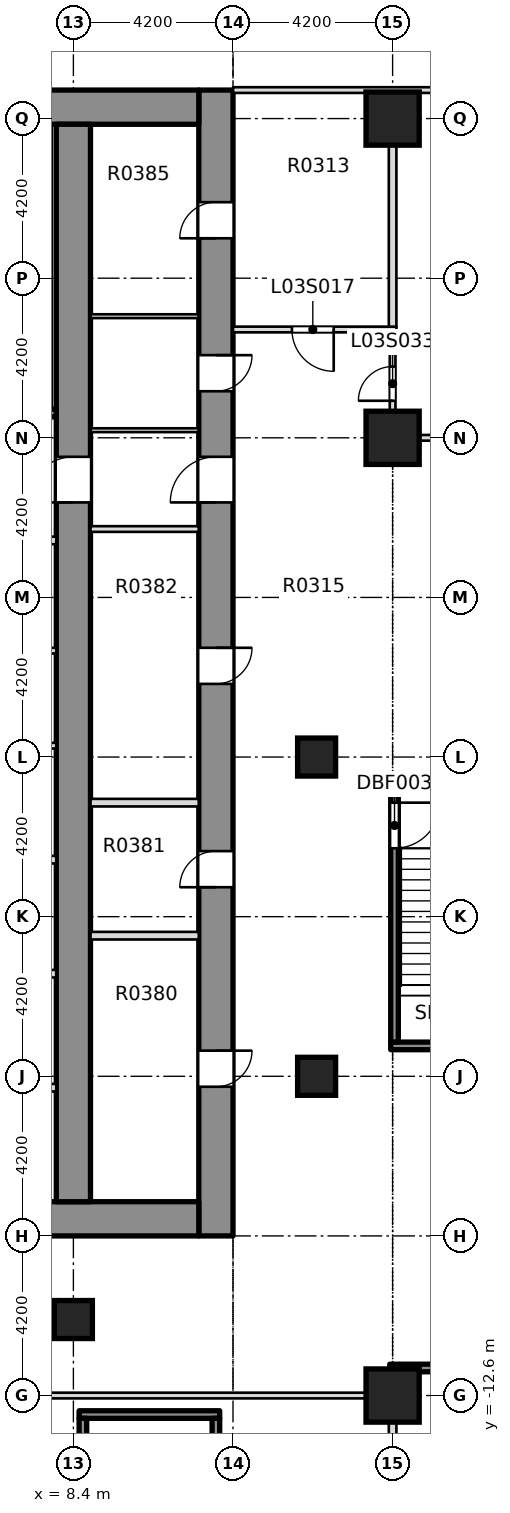
"""IFC4 building model, lengths in metres.
Left out: names, types, materials, properties, quantities, classifications, styles, units other than length and angle.
Written with IfcOpenShell. Run it as: python <this file> out.ifc"""

import sys

from ifc_helpers import new_model, si_unit, direction, frame, frame_2d, origin, origin_2d, place, context, subcontext, project, spatial, rectangle, extrude, element, fill, save


model = new_model("IFC4")
c1 = context("Model", 3, precision=1e-05, world=origin(), true_north=direction((0.0, 1.0)))
c2 = subcontext(c1, "Body", "Model", "MODEL_VIEW")
j1 = project(units=[si_unit("LENGTHUNIT", "METRE"), si_unit("PLANEANGLEUNIT", "RADIAN")], contexts=[c1])
p1 = place(None, origin())
s1 = spatial("IfcSite", under=j1, at=p1, CompositionType="ELEMENT")
p2 = place(p1, origin())
s2 = spatial("IfcBuilding", under=s1, at=p2, CompositionType="ELEMENT")
p3 = place(p2, frame((0.0, 0.0, 20.0)))
s3 = spatial("IfcBuildingStorey", under=s2, at=p3, CompositionType="ELEMENT", Elevation=20.0)
p4 = place(p3, frame((12.15, -8.4, -0.4), z_axis=(0.0, 0.0, 1.0), x_axis=(0.0, 1.0, 0.0)))
e1 = element("IfcWall", 1, at=p4, inside=s3, PredefinedType="SHEAR", context=c2, shape_type="SweptSolid", body=[
    extrude(rectangle(XDim=30.15, YDim=0.9, at=frame_2d((15.075, 0.0))), origin(), (0.0, 0.0, 1.0), 5.0),
])
p5 = place(p4, frame((3.925, 0.0, 0.4)))
e2 = element("IfcOpeningElement", 2, at=p5, cuts=e1, PredefinedType="OPENING", context=c2, shape_type="SweptSolid", body=[
    extrude(rectangle(XDim=0.95, YDim=2.1, at=frame_2d((0.475, 1.05))), frame((0.0, 0.46, 0.0), z_axis=(0.0, -1.0, 0.0), x_axis=(1.0, 0.0, 0.0)), (0.0, 0.0, 1.0), 0.92),
])
p6 = place(p4, frame((9.175, 0.0, 0.4)))
e3 = element("IfcOpeningElement", 3, at=p6, cuts=e1, PredefinedType="OPENING", context=c2, shape_type="SweptSolid", body=[
    extrude(rectangle(XDim=0.95, YDim=2.1, at=frame_2d((0.475, 1.05))), frame((0.0, 0.46, 0.0), z_axis=(0.0, -1.0, 0.0), x_axis=(1.0, 0.0, 0.0)), (0.0, 0.0, 1.0), 0.92),
])
p7 = place(p4, frame((14.525, 0.0, 0.4)))
e4 = element("IfcOpeningElement", 4, at=p7, cuts=e1, PredefinedType="OPENING", context=c2, shape_type="SweptSolid", body=[
    extrude(rectangle(XDim=0.95, YDim=2.1, at=frame_2d((0.475, 1.05))), frame((0.0, 0.46, 0.0), z_axis=(0.0, -1.0, 0.0), x_axis=(1.0, 0.0, 0.0)), (0.0, 0.0, 1.0), 0.92),
])
p8 = place(p4, frame((22.225, 0.0, 0.4)))
e5 = element("IfcOpeningElement", 5, at=p8, cuts=e1, PredefinedType="OPENING", context=c2, shape_type="SweptSolid", body=[
    extrude(rectangle(XDim=0.95, YDim=2.1, at=frame_2d((0.475, 1.05))), frame((0.0, 0.46, 0.0), z_axis=(0.0, -1.0, 0.0), x_axis=(1.0, 0.0, 0.0)), (0.0, 0.0, 1.0), 0.92),
])
p9 = place(p4, frame((26.25, 0.0, 0.4)))
e6 = element("IfcOpeningElement", 6, at=p9, cuts=e1, PredefinedType="OPENING", context=c2, shape_type="SweptSolid", body=[
    extrude(rectangle(XDim=0.95, YDim=2.1, at=frame_2d((0.475, 1.05))), frame((0.0, 0.46, 0.0), z_axis=(0.0, -1.0, 0.0), x_axis=(1.0, 0.0, 0.0)), (0.0, 0.0, 1.0), 0.92),
])
p10 = place(p4, frame((19.3, 0.0, 0.4)))
e7 = element("IfcOpeningElement", 7, at=p10, cuts=e1, PredefinedType="OPENING", context=c2, shape_type="SweptSolid", body=[
    extrude(rectangle(XDim=1.2, YDim=2.1, at=frame_2d((0.6, 1.05))), frame((0.0, 0.46, 0.0), z_axis=(0.0, -1.0, 0.0), x_axis=(1.0, 0.0, 0.0)), (0.0, 0.0, 1.0), 0.92),
])
p11 = place(p3, frame((-11.7, -7.95, -0.4), z_axis=(0.0, 0.0, 1.0), x_axis=(1.0, 0.0, 0.0)))
e8 = element("IfcWall", 8, at=p11, inside=s3, PredefinedType="SHEAR", context=c2, shape_type="SweptSolid", body=[
    extrude(rectangle(XDim=23.4, YDim=0.9, at=frame_2d((11.7, 0.0))), origin(), (0.0, 0.0, 1.0), 5.0),
])
p12 = place(p11, frame((6.95, 0.0, 0.4)))
e9 = element("IfcOpeningElement", 9, at=p12, cuts=e8, PredefinedType="OPENING", context=c2, shape_type="SweptSolid", body=[
    extrude(rectangle(XDim=1.8, YDim=2.1, at=frame_2d((0.9, 1.05))), frame((0.0, 0.46, 0.0), z_axis=(0.0, -1.0, 0.0), x_axis=(1.0, 0.0, 0.0)), (0.0, 0.0, 1.0), 0.92),
])
p13 = place(p11, frame((14.65, 0.0, 0.4)))
e10 = element("IfcOpeningElement", 10, at=p13, cuts=e8, PredefinedType="OPENING", context=c2, shape_type="SweptSolid", body=[
    extrude(rectangle(XDim=1.8, YDim=2.1, at=frame_2d((0.9, 1.05))), frame((0.0, 0.46, 0.0), z_axis=(0.0, -1.0, 0.0), x_axis=(1.0, 0.0, 0.0)), (0.0, 0.0, 1.0), 0.92),
])
p14 = place(p3, frame((-11.7, 21.3, -0.4), z_axis=(0.0, 0.0, 1.0), x_axis=(1.0, 0.0, 0.0)))
e11 = element("IfcWall", 11, at=p14, inside=s3, PredefinedType="SOLIDWALL", context=c2, shape_type="SweptSolid", body=[
    extrude(rectangle(XDim=23.4, YDim=0.9, at=frame_2d((11.7, 0.0))), origin(), (0.0, 0.0, 1.0), 5.0),
])
p15 = place(p3, frame((8.4, -7.5, -0.4), z_axis=(0.0, 0.0, 1.0), x_axis=(0.0, 1.0, 0.0)))
e12 = element("IfcWall", 12, at=p15, inside=s3, PredefinedType="SHEAR", context=c2, shape_type="SweptSolid", body=[
    extrude(rectangle(XDim=28.35, YDim=0.9, at=frame_2d((14.175, 0.0))), origin(), (0.0, 0.0, 1.0), 5.0),
])
p16 = place(p15, frame((18.4, 0.0, 0.4)))
e13 = element("IfcOpeningElement", 13, at=p16, cuts=e12, PredefinedType="OPENING", context=c2, shape_type="SweptSolid", body=[
    extrude(rectangle(XDim=1.2, YDim=2.1, at=frame_2d((0.6, 1.05))), frame((0.0, 0.46, 0.0), z_axis=(0.0, -1.0, 0.0), x_axis=(1.0, 0.0, 0.0)), (0.0, 0.0, 1.0), 0.92),
])
for number, where, z_axis, x_axis in (
    (14, (16.8, -12.6, -0.4), (0.0, 0.0, 1.0), (1.0, 0.0, 0.0)),
    (15, (16.8, 12.6, -0.4), (0.0, 0.0, 1.0), (1.0, 0.0, 0.0)),
    (16, (16.8, 21.0, -0.4), (0.0, 0.0, 1.0), (1.0, 0.0, 0.0)),
):
    element("IfcColumn", number, at=place(p3, frame(where, z_axis=z_axis, x_axis=x_axis)), inside=s3, PredefinedType="COLUMN", context=c2, shape_type="SweptSolid", body=[
        extrude(rectangle(XDim=1.4, YDim=1.4, at=origin_2d()), origin(), (0.0, 0.0, 1.0), 5.0),
    ])
for number, where, z_axis, x_axis in (
    (17, (8.4, -10.6, -0.4), (0.0, 0.0, 1.0), (1.0, 0.0, 0.0)),
    (18, (14.8, -4.2, -0.4), (0.0, 0.0, 1.0), (1.0, 0.0, 0.0)),
    (19, (14.8, 4.2, -0.4), (0.0, 0.0, 1.0), (1.0, 0.0, 0.0)),
):
    element("IfcColumn", number, at=place(p3, frame(where, z_axis=z_axis, x_axis=x_axis)), inside=s3, PredefinedType="COLUMN", context=c2, shape_type="SweptSolid", body=[
        extrude(rectangle(XDim=1.0, YDim=1.0, at=origin_2d()), origin(), (0.0, 0.0, 1.0), 5.0),
    ])
p17 = place(p3, frame((7.275, -12.6, 0.0), z_axis=(0.0, 0.0, 1.0), x_axis=(1.0, 0.0, 0.0)))
e20 = element("IfcWall", 20, at=p17, inside=s3, PredefinedType="PARTITIONING", context=c2, shape_type="SweptSolid", body=[
    extrude(rectangle(XDim=9.625, YDim=0.15, at=frame_2d((4.812, 0.0))), origin(), (0.0, 0.0, 1.0), 4.6),
])
p18 = place(p3, frame((16.725, -11.875, 0.0), z_axis=(0.0, 0.0, 1.0), x_axis=(1.0, 0.0, 0.0)))
e21 = element("IfcWall", 21, at=p18, inside=s3, PredefinedType="SOLIDWALL", context=c2, shape_type="SweptSolid", body=[
    extrude(rectangle(XDim=8.575, YDim=0.2, at=frame_2d((4.288, 0.0))), origin(), (0.0, 0.0, 1.0), 4.6),
])
p19 = place(p3, frame((16.725, 12.6, 0.0), z_axis=(0.0, 0.0, 1.0), x_axis=(1.0, 0.0, 0.0)))
e22 = element("IfcWall", 22, at=p19, inside=s3, PredefinedType="PARTITIONING", context=c2, shape_type="SweptSolid", body=[
    extrude(rectangle(XDim=8.575, YDim=0.15, at=frame_2d((4.288, 0.0))), origin(), (0.0, 0.0, 1.0), 4.6),
])
p20 = place(p3, frame((12.601, 15.45, 0.0), z_axis=(0.0, 0.0, 1.0), x_axis=(1.0, 0.0, 0.0)))
e23 = element("IfcWall", 23, at=p20, inside=s3, PredefinedType="PARTITIONING", context=c2, shape_type="SweptSolid", body=[
    extrude(rectangle(XDim=4.299, YDim=0.15, at=frame_2d((2.149, 0.0))), origin(), (0.0, 0.0, 1.0), 4.6),
])
p21 = place(p20, frame((1.549, 0.0, 0.0)))
e24 = element("IfcOpeningElement", 24, at=p21, cuts=e23, PredefinedType="OPENING", context=c2, shape_type="SweptSolid", body=[
    extrude(rectangle(XDim=1.1, YDim=2.1, at=frame_2d((0.55, 1.05))), frame((0.0, 0.085, 0.0), z_axis=(0.0, -1.0, 0.0), x_axis=(1.0, 0.0, 0.0)), (0.0, 0.0, 1.0), 0.17),
])
p22 = place(p3, frame((12.601, 21.75, 0.0), z_axis=(0.0, 0.0, 1.0), x_axis=(1.0, 0.0, 0.0)))
e25 = element("IfcWall", 25, at=p22, inside=s3, PredefinedType="PARTITIONING", context=c2, shape_type="SweptSolid", body=[
    extrude(rectangle(XDim=21.074, YDim=0.15, at=frame_2d((10.537, 0.0))), origin(), (0.0, 0.0, 1.0), 4.6),
])
p23 = place(p3, frame((16.8, -18.125, 0.0), z_axis=(0.0, 0.0, 1.0), x_axis=(0.0, 1.0, 0.0)))
e26 = element("IfcWall", 26, at=p23, inside=s3, PredefinedType="PARTITIONING", context=c2, shape_type="SweptSolid", body=[
    extrude(rectangle(XDim=5.45, YDim=0.2, at=frame_2d((2.725, 0.0))), origin(), (0.0, 0.0, 1.0), 4.6),
])
p24 = place(p3, frame((16.8, -12.525, 0.0), z_axis=(0.0, 0.0, 1.0), x_axis=(0.0, 1.0, 0.0)))
e27 = element("IfcWall", 27, at=p24, inside=s3, PredefinedType="PARTITIONING", context=c2, shape_type="SweptSolid", body=[
    extrude(rectangle(XDim=0.55, YDim=0.15, at=frame_2d((0.275, 0.0))), origin(), (0.0, 0.0, 1.0), 4.6),
])
p25 = place(p3, frame((16.8, 12.675, 0.0), z_axis=(0.0, 0.0, 1.0), x_axis=(0.0, 1.0, 0.0)))
e28 = element("IfcWall", 28, at=p25, inside=s3, PredefinedType="PARTITIONING", context=c2, shape_type="SweptSolid", body=[
    extrude(rectangle(XDim=2.7, YDim=0.15, at=frame_2d((1.35, 0.0))), origin(), (0.0, 0.0, 1.0), 4.6),
])
p26 = place(p25, frame((0.9, 0.0, 0.0)))
e29 = element("IfcOpeningElement", 29, at=p26, cuts=e28, PredefinedType="OPENING", context=c2, shape_type="SweptSolid", body=[
    extrude(rectangle(XDim=0.9, YDim=2.1, at=frame_2d((0.45, 1.05))), frame((0.0, 0.085, 0.0), z_axis=(0.0, -1.0, 0.0), x_axis=(1.0, 0.0, 0.0)), (0.0, 0.0, 1.0), 0.17),
])
p27 = place(p3, frame((16.8, 15.525, 0.0), z_axis=(0.0, 0.0, 1.0), x_axis=(0.0, 1.0, 0.0)))
e30 = element("IfcWall", 30, at=p27, inside=s3, PredefinedType="PARTITIONING", context=c2, shape_type="SweptSolid", body=[
    extrude(rectangle(XDim=6.15, YDim=0.2, at=frame_2d((3.075, 0.0))), origin(), (0.0, 0.0, 1.0), 4.6),
])
for number, where, z_axis, x_axis in (
    (31, (5.575, -4.5, 0.0), (0.0, 0.0, 1.0), (1.0, 0.0, 0.0)),
    (32, (5.575, -1.5, 0.0), (0.0, 0.0, 1.0), (1.0, 0.0, 0.0)),
    (33, (5.575, 1.5, 0.0), (0.0, 0.0, 1.0), (1.0, 0.0, 0.0)),
):
    element("IfcWall", number, at=place(p3, frame(where, z_axis=z_axis, x_axis=x_axis)), inside=s3, PredefinedType="PARTITIONING", context=c2, shape_type="SweptSolid", body=[
        extrude(rectangle(XDim=2.374, YDim=0.2, at=frame_2d((1.187, 0.0))), origin(), (0.0, 0.0, 1.0), 4.6),
    ])
p28 = place(p3, frame((5.425, 4.5, 0.0), z_axis=(0.0, 0.0, 1.0), x_axis=(1.0, 0.0, 0.0)))
e34 = element("IfcWall", 34, at=p28, inside=s3, PredefinedType="PARTITIONING", context=c2, shape_type="SweptSolid", body=[
    extrude(rectangle(XDim=2.524, YDim=0.15, at=frame_2d((1.262, 0.0))), origin(), (0.0, 0.0, 1.0), 4.6),
])
p29 = place(p3, frame((-7.949, 7.0, 0.0), z_axis=(0.0, 0.0, 1.0), x_axis=(1.0, 0.0, 0.0)))
e35 = element("IfcWall", 35, at=p29, inside=s3, PredefinedType="PARTITIONING", context=c2, shape_type="SweptSolid", body=[
    extrude(rectangle(XDim=15.898, YDim=0.15, at=frame_2d((7.949, 0.0))), origin(), (0.0, 0.0, 1.0), 4.6),
])
p30 = place(p29, frame((7.249, 0.0, 0.0)))
e36 = element("IfcOpeningElement", 36, at=p30, cuts=e35, PredefinedType="OPENING", context=c2, shape_type="SweptSolid", body=[
    extrude(rectangle(XDim=1.4, YDim=2.1, at=frame_2d((0.7, 1.05))), frame((0.0, 0.085, 0.0), z_axis=(0.0, -1.0, 0.0), x_axis=(1.0, 0.0, 0.0)), (0.0, 0.0, 1.0), 0.17),
])
p31 = place(p3, frame((3.6, 9.9, 0.0), z_axis=(0.0, 0.0, 1.0), x_axis=(1.0, 0.0, 0.0)))
e37 = element("IfcWall", 37, at=p31, inside=s3, PredefinedType="PARTITIONING", context=c2, shape_type="SweptSolid", body=[
    extrude(rectangle(XDim=4.349, YDim=0.2, at=frame_2d((2.174, 0.0))), origin(), (0.0, 0.0, 1.0), 4.6),
])
p32 = place(p31, frame((2.25, 0.0, 0.0)))
e38 = element("IfcOpeningElement", 38, at=p32, cuts=e37, PredefinedType="OPENING", context=c2, shape_type="SweptSolid", body=[
    extrude(rectangle(XDim=1.1, YDim=2.1, at=frame_2d((0.55, 1.05))), frame((0.0, 0.11, 0.0), z_axis=(0.0, -1.0, 0.0), x_axis=(1.0, 0.0, 0.0)), (0.0, 0.0, 1.0), 0.22),
])
p33 = place(p3, frame((3.425, 13.25, 0.0), z_axis=(0.0, 0.0, 1.0), x_axis=(1.0, 0.0, 0.0)))
e39 = element("IfcWall", 39, at=p33, inside=s3, PredefinedType="SOLIDWALL", context=c2, shape_type="SweptSolid", body=[
    extrude(rectangle(XDim=4.524, YDim=0.2, at=frame_2d((2.262, 0.0))), origin(), (0.0, 0.0, 1.0), 4.6),
])
p34 = place(p33, frame((1.825, 0.0, 0.0)))
e40 = element("IfcOpeningElement", 40, at=p34, cuts=e39, PredefinedType="OPENING", context=c2, shape_type="SweptSolid", body=[
    extrude(rectangle(XDim=1.2, YDim=2.1, at=frame_2d((0.6, 1.05))), frame((0.0, 0.11, 0.0), z_axis=(0.0, -1.0, 0.0), x_axis=(1.0, 0.0, 0.0)), (0.0, 0.0, 1.0), 0.22),
])
for number, where, z_axis, x_axis in (
    (41, (8.851, -0.5, 0.0), (0.0, 0.0, 1.0), (1.0, 0.0, 0.0)),
    (42, (8.851, 3.0, 0.0), (0.0, 0.0, 1.0), (1.0, 0.0, 0.0)),
):
    element("IfcWall", number, at=place(p3, frame(where, z_axis=z_axis, x_axis=x_axis)), inside=s3, PredefinedType="PARTITIONING", context=c2, shape_type="SweptSolid", body=[
        extrude(rectangle(XDim=2.848, YDim=0.2, at=frame_2d((1.424, 0.0))), origin(), (0.0, 0.0, 1.0), 4.6),
    ])
p35 = place(p3, frame((8.851, 10.2, 0.0), z_axis=(0.0, 0.0, 1.0), x_axis=(1.0, 0.0, 0.0)))
e43 = element("IfcWall", 43, at=p35, inside=s3, PredefinedType="PARTITIONING", context=c2, shape_type="SweptSolid", body=[
    extrude(rectangle(XDim=2.848, YDim=0.15, at=frame_2d((1.424, 0.0))), origin(), (0.0, 0.0, 1.0), 4.6),
])
for number, where, z_axis, x_axis in (
    (44, (8.851, 12.8, 0.0), (0.0, 0.0, 1.0), (1.0, 0.0, 0.0)),
    (45, (8.851, 15.8, 0.0), (0.0, 0.0, 1.0), (1.0, 0.0, 0.0)),
):
    element("IfcWall", number, at=place(p3, frame(where, z_axis=z_axis, x_axis=x_axis)), inside=s3, PredefinedType="PARTITIONING", context=c2, shape_type="SweptSolid", body=[
        extrude(rectangle(XDim=2.848, YDim=0.1, at=frame_2d((1.424, 0.0))), origin(), (0.0, 0.0, 1.0), 4.6),
    ])
p36 = place(p3, frame((8.55, -13.1, 0.0), z_axis=(0.0, 0.0, 1.0), x_axis=(1.0, 0.0, 0.0)))
e46 = element("IfcWall", 46, at=p36, inside=s3, PredefinedType="SOLIDWALL", context=c2, shape_type="SweptSolid", body=[
    extrude(rectangle(XDim=3.7, YDim=0.2, at=frame_2d((1.85, 0.0))), origin(), (0.0, 0.0, 1.0), 4.6),
])
p37 = place(p3, frame((8.65, -20.3, 0.0), z_axis=(0.0, 0.0, 1.0), x_axis=(0.0, 1.0, 0.0)))
e47 = element("IfcWall", 47, at=p37, inside=s3, PredefinedType="SOLIDWALL", context=c2, shape_type="SweptSolid", body=[
    extrude(rectangle(XDim=7.1, YDim=0.2, at=frame_2d((3.55, 0.0))), origin(), (0.0, 0.0, 1.0), 4.6),
])
p38 = place(p3, frame((12.15, -19.8, 0.0), z_axis=(0.0, 0.0, 1.0), x_axis=(0.0, 1.0, 0.0)))
e48 = element("IfcWall", 48, at=p38, inside=s3, PredefinedType="SOLIDWALL", context=c2, shape_type="SweptSolid", body=[
    extrude(rectangle(XDim=6.6, YDim=0.2, at=frame_2d((3.3, 0.0))), origin(), (0.0, 0.0, 1.0), 4.6),
])
for number, where, z_axis, x_axis in (
    (49, (16.75, -3.4, 0.0), (0.0, 0.0, 1.0), (1.0, 0.0, 0.0)),
    (50, (16.75, 3.4, 0.0), (0.0, 0.0, 1.0), (1.0, 0.0, 0.0)),
):
    element("IfcWall", number, at=place(p3, frame(where, z_axis=z_axis, x_axis=x_axis)), inside=s3, PredefinedType="SOLIDWALL", context=c2, shape_type="SweptSolid", body=[
        extrude(rectangle(XDim=3.7, YDim=0.2, at=frame_2d((1.85, 0.0))), origin(), (0.0, 0.0, 1.0), 4.6),
    ])
p39 = place(p3, frame((16.85, -3.3, 0.0), z_axis=(0.0, 0.0, 1.0), x_axis=(0.0, 1.0, 0.0)))
e51 = element("IfcWall", 51, at=p39, inside=s3, PredefinedType="SOLIDWALL", context=c2, shape_type="SweptSolid", body=[
    extrude(rectangle(XDim=6.6, YDim=0.2, at=frame_2d((3.3, 0.0))), origin(), (0.0, 0.0, 1.0), 4.6),
])
p40 = place(p39, frame((5.1, 0.0, 0.0)))
e52 = element("IfcOpeningElement", 52, at=p40, cuts=e51, PredefinedType="OPENING", context=c2, shape_type="SweptSolid", body=[
    extrude(rectangle(XDim=1.2, YDim=2.1, at=frame_2d((0.6, 1.05))), frame((0.0, 0.11, 0.0), z_axis=(0.0, -1.0, 0.0), x_axis=(1.0, 0.0, 0.0)), (0.0, 0.0, 1.0), 0.22),
])
p41 = place(p21, origin())
e53 = element("IfcDoor", 53, at=p41, inside=s3, OperationType="SINGLE_SWING_LEFT", PredefinedType="DOOR", context=c2, shape_type="SweptSolid", body=[
    extrude(rectangle(XDim=1.1, YDim=2.1, at=frame_2d((0.55, 1.05))), frame((0.0, 0.025, 0.0), z_axis=(0.0, -1.0, 0.0), x_axis=(1.0, 0.0, 0.0)), (0.0, 0.0, 1.0), 0.05),
])
fill(e24, e53)
p42 = place(p26, origin())
e54 = element("IfcDoor", 54, at=p42, inside=s3, OperationType="SINGLE_SWING_RIGHT", PredefinedType="DOOR", context=c2, shape_type="SweptSolid", body=[
    extrude(rectangle(XDim=0.9, YDim=2.1, at=frame_2d((0.45, 1.05))), frame((0.0, 0.025, 0.0), z_axis=(0.0, -1.0, 0.0), x_axis=(1.0, 0.0, 0.0)), (0.0, 0.0, 1.0), 0.05),
])
fill(e29, e54)
p43 = place(p5, origin())
e55 = element("IfcDoor", 55, at=p43, inside=s3, OperationType="SINGLE_SWING_LEFT", PredefinedType="DOOR", context=c2, shape_type="SweptSolid", body=[
    extrude(rectangle(XDim=0.95, YDim=2.1, at=frame_2d((0.475, 1.05))), frame((0.0, 0.025, 0.0), z_axis=(0.0, -1.0, 0.0), x_axis=(1.0, 0.0, 0.0)), (0.0, 0.0, 1.0), 0.05),
])
fill(e2, e55)
p44 = place(p6, origin())
e56 = element("IfcDoor", 56, at=p44, inside=s3, OperationType="SINGLE_SWING_LEFT", PredefinedType="DOOR", context=c2, shape_type="SweptSolid", body=[
    extrude(rectangle(XDim=0.95, YDim=2.1, at=frame_2d((0.475, 1.05))), frame((0.0, 0.025, 0.0), z_axis=(0.0, -1.0, 0.0), x_axis=(1.0, 0.0, 0.0)), (0.0, 0.0, 1.0), 0.05),
])
fill(e3, e56)
p45 = place(p7, origin())
e57 = element("IfcDoor", 57, at=p45, inside=s3, OperationType="SINGLE_SWING_LEFT", PredefinedType="DOOR", context=c2, shape_type="SweptSolid", body=[
    extrude(rectangle(XDim=0.95, YDim=2.1, at=frame_2d((0.475, 1.05))), frame((0.0, 0.025, 0.0), z_axis=(0.0, -1.0, 0.0), x_axis=(1.0, 0.0, 0.0)), (0.0, 0.0, 1.0), 0.05),
])
fill(e4, e57)
p46 = place(p8, origin())
e58 = element("IfcDoor", 58, at=p46, inside=s3, OperationType="SINGLE_SWING_LEFT", PredefinedType="DOOR", context=c2, shape_type="SweptSolid", body=[
    extrude(rectangle(XDim=0.95, YDim=2.1, at=frame_2d((0.475, 1.05))), frame((0.0, 0.025, 0.0), z_axis=(0.0, -1.0, 0.0), x_axis=(1.0, 0.0, 0.0)), (0.0, 0.0, 1.0), 0.05),
])
fill(e5, e58)
p47 = place(p9, origin())
e59 = element("IfcDoor", 59, at=p47, inside=s3, OperationType="SINGLE_SWING_LEFT", PredefinedType="DOOR", context=c2, shape_type="SweptSolid", body=[
    extrude(rectangle(XDim=0.95, YDim=2.1, at=frame_2d((0.475, 1.05))), frame((0.0, 0.025, 0.0), z_axis=(0.0, -1.0, 0.0), x_axis=(1.0, 0.0, 0.0)), (0.0, 0.0, 1.0), 0.05),
])
fill(e6, e59)
p48 = place(p10, origin())
e60 = element("IfcDoor", 60, at=p48, inside=s3, OperationType="SINGLE_SWING_LEFT", PredefinedType="DOOR", context=c2, shape_type="SweptSolid", body=[
    extrude(rectangle(XDim=1.2, YDim=2.1, at=frame_2d((0.6, 1.05))), frame((0.0, 0.025, 0.0), z_axis=(0.0, -1.0, 0.0), x_axis=(1.0, 0.0, 0.0)), (0.0, 0.0, 1.0), 0.05),
])
fill(e7, e60)
p49 = place(p16, origin())
e61 = element("IfcDoor", 61, at=p49, inside=s3, OperationType="SINGLE_SWING_LEFT", PredefinedType="DOOR", context=c2, shape_type="SweptSolid", body=[
    extrude(rectangle(XDim=1.2, YDim=2.1, at=frame_2d((0.6, 1.05))), frame((0.0, 0.025, 0.0), z_axis=(0.0, -1.0, 0.0), x_axis=(1.0, 0.0, 0.0)), (0.0, 0.0, 1.0), 0.05),
])
fill(e13, e61)
p50 = place(p40, origin())
e62 = element("IfcDoor", 62, at=p50, inside=s3, OperationType="SINGLE_SWING_LEFT", PredefinedType="DOOR", context=c2, shape_type="SweptSolid", body=[
    extrude(rectangle(XDim=1.2, YDim=2.1, at=frame_2d((0.6, 1.05))), frame((0.0, 0.025, 0.0), z_axis=(0.0, -1.0, 0.0), x_axis=(1.0, 0.0, 0.0)), (0.0, 0.0, 1.0), 0.05),
])
fill(e52, e62)
save(model, sys.argv[1])
